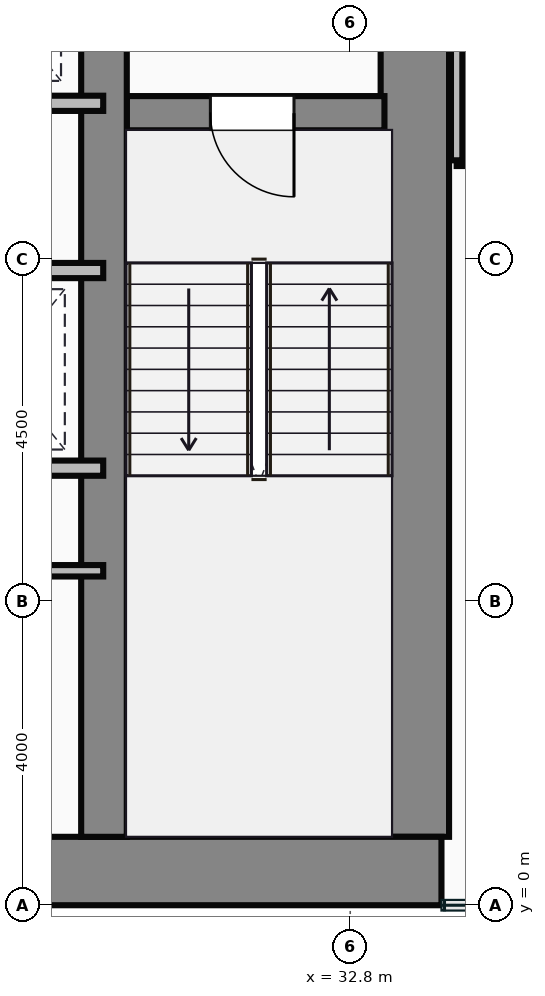
"""IFC4 building model, lengths in metres.
Left out: names, types, materials, properties, quantities, classifications, styles, units other than length and angle.
Written with IfcOpenShell. Run it as: python <this file> out.ifc"""

import sys

from ifc_helpers import new_model, si_unit, direction, frame, frame_2d, origin, place, context, subcontext, project, spatial, rectangle, extrude, source, transform, mapped, element, fill, save


model = new_model("IFC4")
c1 = context("Model", 3, precision=1e-05, world=origin(), true_north=direction((0.0, 1.0)))
c2 = subcontext(c1, "Body", "Model", "MODEL_VIEW")
j1 = project(units=[si_unit("LENGTHUNIT", "METRE"), si_unit("PLANEANGLEUNIT", "RADIAN")], contexts=[c1])
p1 = place(None, origin())
s1 = spatial("IfcSite", under=j1, at=p1, CompositionType="ELEMENT")
p2 = place(p1, origin())
s2 = spatial("IfcBuilding", under=s1, at=p2, CompositionType="ELEMENT")
p3 = place(p2, frame((0.0, 0.0, 72.65)))
s3 = spatial("IfcBuildingStorey", under=s2, at=p3, CompositionType="ELEMENT", Elevation=72.65)
m1 = source(origin(), c2, "Body", "SweptSolid", [
    extrude(rectangle(XDim=29.5, YDim=0.9, at=frame_2d((14.75, 0.0))), origin(), (0.0, 0.0, 1.0), 3.65),
])
p4 = place(p3, frame((4.5, 0.45, 0.0), z_axis=(0.0, 0.0, 1.0), x_axis=(1.0, 0.0, 0.0)))
e1 = element("IfcWall", 1, at=p4, inside=s3, PredefinedType="SHEAR", context=c2, shape_type="MappedRepresentation", body=[
    mapped(m1, transform((0.0, 0.0, 0.0))),
])
m2 = source(origin(), c2, "Body", "SweptSolid", [
    extrude(rectangle(XDim=13.1, YDim=0.9, at=frame_2d((6.55, 0.0))), origin(), (0.0, 0.0, 1.0), 3.65),
])
p5 = place(p3, frame((33.65, 0.9, 0.0), z_axis=(0.0, 0.0, 1.0), x_axis=(0.0, 1.0, 0.0)))
e2 = element("IfcWall", 2, at=p5, inside=s3, PredefinedType="SHEAR", context=c2, shape_type="MappedRepresentation", body=[
    mapped(m2, transform((0.0, 0.0, 0.0))),
])
m3 = source(origin(), c2, "Body", "SweptSolid", [
    extrude(rectangle(XDim=12.2, YDim=0.6, at=frame_2d((6.1, 0.0))), origin(), (0.0, 0.0, 1.0), 3.65),
])
p6 = place(p3, frame((29.56, 0.9, 0.0), z_axis=(0.0, 0.0, 1.0), x_axis=(0.0, 1.0, 0.0)))
e3 = element("IfcWall", 3, at=p6, inside=s3, PredefinedType="SHEAR", context=c2, shape_type="MappedRepresentation", body=[
    mapped(m3, transform((0.0, 0.0, 0.0))),
])
m4 = source(origin(), c2, "Body", "SweptSolid", [
    extrude(rectangle(XDim=3.39, YDim=0.45, at=frame_2d((1.695, 0.0))), origin(), (0.0, 0.0, 1.0), 3.65),
])
p7 = place(p3, frame((29.86, 10.42, 0.0), z_axis=(0.0, 0.0, 1.0), x_axis=(1.0, 0.0, 0.0)))
e4 = element("IfcWall", 4, at=p7, inside=s3, PredefinedType="SHEAR", context=c2, shape_type="MappedRepresentation", body=[
    mapped(m4, transform((0.0, 0.0, 0.0))),
])
p8 = place(p7, frame((1.1, 0.0, 0.0)))
e5 = element("IfcOpeningElement", 5, at=p8, cuts=e4, PredefinedType="OPENING", context=c2, shape_type="SweptSolid", body=[
    extrude(rectangle(XDim=1.1, YDim=2.15, at=frame_2d((0.55, 1.075))), frame((0.0, 0.235, 0.0), z_axis=(0.0, -1.0, 0.0), x_axis=(1.0, 0.0, 0.0)), (0.0, 0.0, 1.0), 0.47),
])
m5 = source(origin(), c2, "Body", "SweptSolid", [
    extrude(rectangle(XDim=8.8, YDim=0.2, at=frame_2d((4.4, 0.0))), origin(), (0.0, 0.0, 1.0), 3.4),
])
p9 = place(p3, frame((20.75, 10.55, 0.0), z_axis=(0.0, 0.0, 1.0), x_axis=(1.0, 0.0, 0.0)))
e6 = element("IfcWall", 6, at=p9, inside=s3, PredefinedType="PARTITIONING", context=c2, shape_type="MappedRepresentation", body=[
    mapped(m5, transform((0.0, 0.0, 0.0))),
])
m6 = source(origin(), c2, "Body", "SweptSolid", [
    extrude(rectangle(XDim=4.55, YDim=0.2, at=frame_2d((2.275, 0.0))), origin(), (0.0, 0.0, 1.0), 3.4),
])
for number, where, z_axis, x_axis in (
    (7, (25.0, 8.35, 0.0), (0.0, 0.0, 1.0), (1.0, 0.0, 0.0)),
    (8, (25.0, 5.75, 0.0), (0.0, 0.0, 1.0), (1.0, 0.0, 0.0)),
):
    element("IfcWall", number, at=place(p3, frame(where, z_axis=z_axis, x_axis=x_axis)), inside=s3, PredefinedType="PARTITIONING", context=c2, shape_type="MappedRepresentation", body=[
        mapped(m6, transform((0.0, 0.0, 0.0))),
    ])
m7 = source(origin(), c2, "Body", "SweptSolid", [
    extrude(rectangle(XDim=4.55, YDim=0.15, at=frame_2d((2.275, 0.0))), origin(), (0.0, 0.0, 1.0), 3.4),
])
p10 = place(p3, frame((25.0, 4.4, 0.0), z_axis=(0.0, 0.0, 1.0), x_axis=(1.0, 0.0, 0.0)))
e9 = element("IfcWall", 9, at=p10, inside=s3, PredefinedType="PARTITIONING", context=c2, shape_type="MappedRepresentation", body=[
    mapped(m7, transform((0.0, 0.0, 0.0))),
])
m8 = source(origin(), c2, "Body", "SweptSolid", [
    extrude(rectangle(XDim=4.8, YDim=0.15, at=frame_2d((2.4, 0.0))), origin(), (0.0, 0.0, 1.0), 3.4),
])
p11 = place(p3, frame((34.2, 9.8, 0.0), z_axis=(0.0, 0.0, 1.0), x_axis=(1.0, 0.0, 0.0)))
e10 = element("IfcWall", 10, at=p11, inside=s3, PredefinedType="PARTITIONING", context=c2, shape_type="MappedRepresentation", body=[
    mapped(m8, transform((0.0, 0.0, 0.0))),
])
m9 = source(origin(), c2, "Body", "SweptSolid", [
    extrude(rectangle(XDim=4.18, YDim=0.15, at=frame_2d((2.09, 0.0))), origin(), (0.0, 0.0, 1.0), 3.4),
])
p12 = place(p3, frame((34.2, 9.8, 0.0), z_axis=(0.0, 0.0, 1.0), x_axis=(0.0, 1.0, 0.0)))
e11 = element("IfcWall", 11, at=p12, inside=s3, PredefinedType="PARTITIONING", context=c2, shape_type="MappedRepresentation", body=[
    mapped(m9, transform((0.0, 0.0, 0.0))),
])
m10 = source(origin(), c2, "Body", "SweptSolid", [
    extrude(rectangle(XDim=1.1, YDim=2.15, at=frame_2d((0.55, 1.075))), frame((0.0, 0.025, 0.0), z_axis=(0.0, -1.0, 0.0), x_axis=(1.0, 0.0, 0.0)), (0.0, 0.0, 1.0), 0.05),
])
p13 = place(p8, frame((1.1, 0.0, 0.0), z_axis=(0.0, 0.0, 1.0), x_axis=(-1.0, 0.0, 0.0)))
e12 = element("IfcDoor", 12, at=p13, inside=s3, OperationType="SINGLE_SWING_RIGHT", PredefinedType="DOOR", context=c2, shape_type="MappedRepresentation", body=[
    mapped(m10, transform((0.0, 0.0, 0.0))),
])
fill(e5, e12)
save(model, sys.argv[1])
